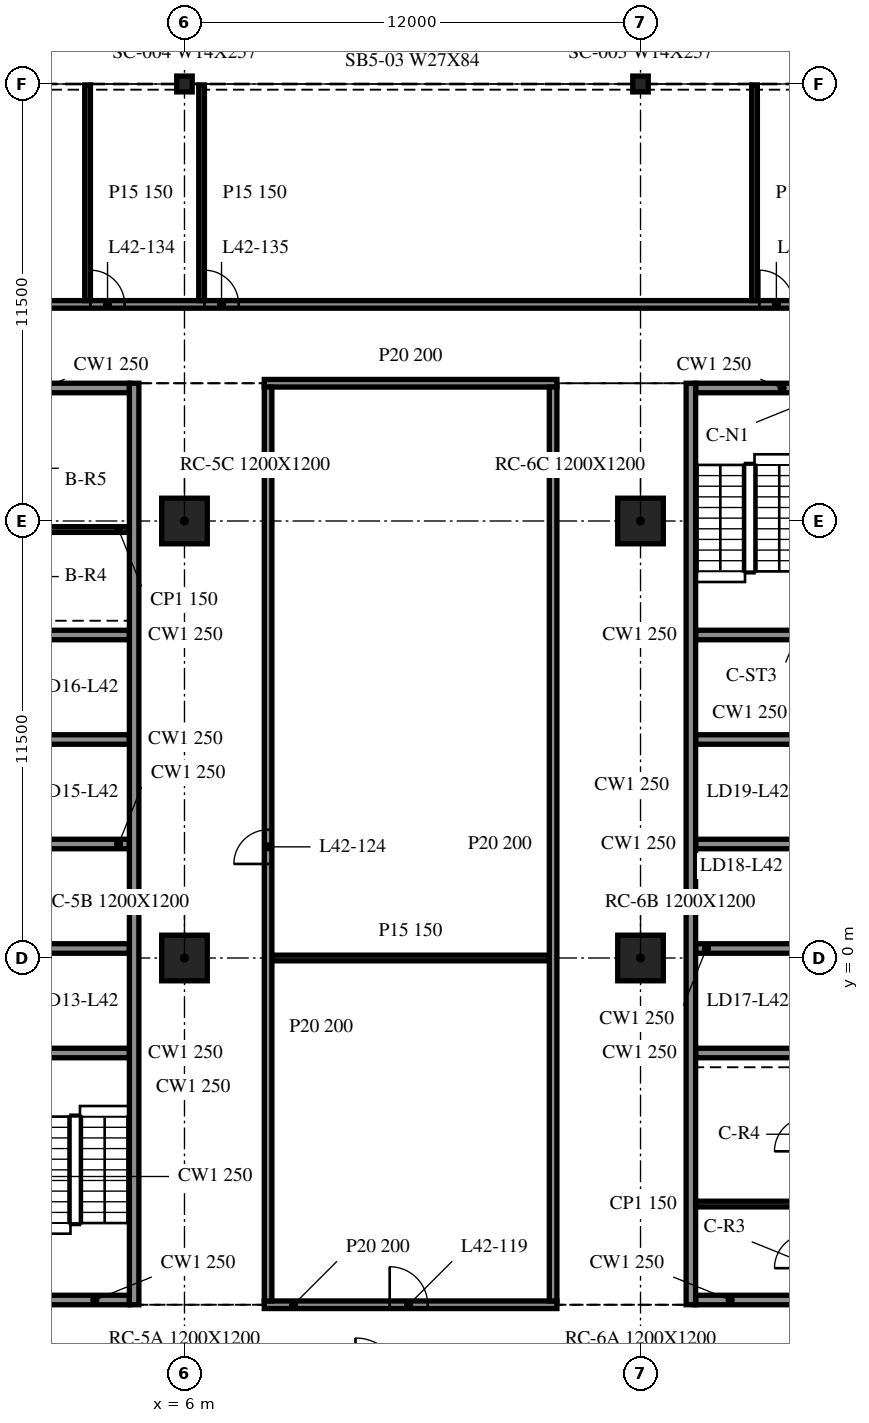
"""IFC4 building model, lengths in metres.
Left out: names, types, materials, properties, quantities, classifications, styles, units other than length and angle.
Written with IfcOpenShell. Run it as: python <this file> out.ifc"""

import sys

from ifc_helpers import new_model, si_unit, direction, frame, frame_2d, origin, origin_2d, place, context, subcontext, project, spatial, rectangle, i_section, extrude, element, fill, save


model = new_model("IFC4")
c1 = context("Model", 3, precision=1e-05, world=origin(), true_north=direction((0.0, 1.0)))
c2 = subcontext(c1, "Body", "Model", "MODEL_VIEW")
j1 = project(units=[si_unit("LENGTHUNIT", "METRE"), si_unit("PLANEANGLEUNIT", "RADIAN")], contexts=[c1])
p1 = place(None, origin())
s1 = spatial("IfcSite", under=j1, at=p1, CompositionType="ELEMENT")
p2 = place(p1, origin())
s2 = spatial("IfcBuilding", under=s1, at=p2, CompositionType="ELEMENT")
p3 = place(p2, frame((0.0, 0.0, 178.2)))
s3 = spatial("IfcBuildingStorey", under=s2, at=p3, CompositionType="ELEMENT", Elevation=178.2)
for number, where, z_axis, x_axis in (
    (1, (6.0, 0.0, -0.34), (0.0, 0.0, 1.0), (1.0, 0.0, 0.0)),
    (2, (6.0, 11.5, -0.34), (0.0, 0.0, 1.0), (1.0, 0.0, 0.0)),
    (3, (18.0, 0.0, -0.34), (0.0, 0.0, 1.0), (1.0, 0.0, 0.0)),
    (4, (18.0, 11.5, -0.34), (0.0, 0.0, 1.0), (1.0, 0.0, 0.0)),
):
    element("IfcColumn", number, at=place(p3, frame(where, z_axis=z_axis, x_axis=x_axis)), inside=s3, PredefinedType="COLUMN", context=c2, shape_type="SweptSolid", body=[
        extrude(rectangle(XDim=1.2, YDim=1.2, at=origin_2d()), origin(), (0.0, 0.0, 1.0), 3.8),
    ])
for number, where, z_axis, x_axis in (
    (5, (18.0, 23.0, -0.34), (0.0, 0.0, 1.0), (1.0, 0.0, 0.0)),
    (6, (6.0, 23.0, -0.34), (0.0, 0.0, 1.0), (1.0, 0.0, 0.0)),
):
    element("IfcColumn", number, at=place(p3, frame(where, z_axis=z_axis, x_axis=x_axis)), inside=s3, PredefinedType="COLUMN", context=c2, shape_type="SweptSolid", body=[
        extrude(i_section(OverallWidth=0.406, OverallDepth=0.417, WebThickness=0.03, FlangeThickness=0.048, at=origin_2d()), origin(), (0.0, 0.0, 1.0), 3.8),
    ])
p4 = place(p3, frame((4.675, -9.125, 0.0), z_axis=(0.0, 0.0, 1.0), x_axis=(0.0, 1.0, 0.0)))
e7 = element("IfcWall", 7, at=p4, inside=s3, PredefinedType="SOLIDWALL", context=c2, shape_type="SweptSolid", body=[
    extrude(rectangle(XDim=24.25, YDim=0.25, at=frame_2d((12.125, 0.0))), origin(), (0.0, 0.0, 1.0), 3.46),
])
p5 = place(p3, frame((4.55, -9.0, 0.0), z_axis=(0.0, 0.0, 1.0), x_axis=(-1.0, 0.0, 0.0)))
e8 = element("IfcWall", 8, at=p5, inside=s3, PredefinedType="SOLIDWALL", context=c2, shape_type="SweptSolid", body=[
    extrude(rectangle(XDim=9.1, YDim=0.25, at=frame_2d((4.55, 0.0))), origin(), (0.0, 0.0, 1.0), 3.46),
])
p6 = place(p5, frame((3.65, 0.0, 0.0)))
e9 = element("IfcOpeningElement", 9, at=p6, cuts=e8, PredefinedType="OPENING", context=c2, shape_type="SweptSolid", body=[
    extrude(rectangle(XDim=1.8, YDim=2.1, at=frame_2d((0.9, 1.05))), frame((0.0, 0.135, 0.0), z_axis=(0.0, -1.0, 0.0), x_axis=(1.0, 0.0, 0.0)), (0.0, 0.0, 1.0), 0.27),
])
p7 = place(p3, frame((-4.55, 15.0, 0.0), z_axis=(0.0, 0.0, 1.0), x_axis=(1.0, 0.0, 0.0)))
e10 = element("IfcWall", 10, at=p7, inside=s3, PredefinedType="SOLIDWALL", context=c2, shape_type="SweptSolid", body=[
    extrude(rectangle(XDim=9.1, YDim=0.25, at=frame_2d((4.55, 0.0))), origin(), (0.0, 0.0, 1.0), 3.46),
])
p8 = place(p7, frame((3.65, 0.0, 0.0)))
e11 = element("IfcOpeningElement", 11, at=p8, cuts=e10, PredefinedType="OPENING", context=c2, shape_type="SweptSolid", body=[
    extrude(rectangle(XDim=1.8, YDim=2.1, at=frame_2d((0.9, 1.05))), frame((0.0, 0.135, 0.0), z_axis=(0.0, -1.0, 0.0), x_axis=(1.0, 0.0, 0.0)), (0.0, 0.0, 1.0), 0.27),
])
for number, where, z_axis, x_axis in (
    (12, (1.7, -2.5, 0.0), (0.0, 0.0, 1.0), (1.0, 0.0, 0.0)),
    (13, (1.7, 0.25, 0.0), (0.0, 0.0, 1.0), (1.0, 0.0, 0.0)),
    (14, (1.7, 3.0, 0.0), (0.0, 0.0, 1.0), (1.0, 0.0, 0.0)),
    (15, (1.7, 5.75, 0.0), (0.0, 0.0, 1.0), (1.0, 0.0, 0.0)),
    (16, (1.7, 8.5, 0.0), (0.0, 0.0, 1.0), (1.0, 0.0, 0.0)),
):
    element("IfcWall", number, at=place(p3, frame(where, z_axis=z_axis, x_axis=x_axis)), inside=s3, PredefinedType="SOLIDWALL", context=c2, shape_type="SweptSolid", body=[
        extrude(rectangle(XDim=2.85, YDim=0.25, at=frame_2d((1.425, 0.0))), origin(), (0.0, 0.0, 1.0), 3.46),
    ])
p9 = place(p3, frame((1.7, 11.275, 0.0), z_axis=(0.0, 0.0, 1.0), x_axis=(1.0, 0.0, 0.0)))
e17 = element("IfcWall", 17, at=p9, inside=s3, PredefinedType="PARTITIONING", context=c2, shape_type="SweptSolid", body=[
    extrude(rectangle(XDim=2.85, YDim=0.15, at=frame_2d((1.425, 0.0))), origin(), (0.0, 0.0, 1.0), 3.46),
])
p10 = place(p3, frame((19.325, 15.125, 0.0), z_axis=(0.0, 0.0, 1.0), x_axis=(0.0, -1.0, 0.0)))
e18 = element("IfcWall", 18, at=p10, inside=s3, PredefinedType="SOLIDWALL", context=c2, shape_type="SweptSolid", body=[
    extrude(rectangle(XDim=24.25, YDim=0.25, at=frame_2d((12.125, 0.0))), origin(), (0.0, 0.0, 1.0), 3.46),
])
p11 = place(p3, frame((28.55, -9.0, 0.0), z_axis=(0.0, 0.0, 1.0), x_axis=(-1.0, 0.0, 0.0)))
e19 = element("IfcWall", 19, at=p11, inside=s3, PredefinedType="SOLIDWALL", context=c2, shape_type="SweptSolid", body=[
    extrude(rectangle(XDim=9.1, YDim=0.25, at=frame_2d((4.55, 0.0))), origin(), (0.0, 0.0, 1.0), 3.46),
])
p12 = place(p11, frame((3.65, 0.0, 0.0)))
e20 = element("IfcOpeningElement", 20, at=p12, cuts=e19, PredefinedType="OPENING", context=c2, shape_type="SweptSolid", body=[
    extrude(rectangle(XDim=1.8, YDim=2.1, at=frame_2d((0.9, 1.05))), frame((0.0, 0.135, 0.0), z_axis=(0.0, -1.0, 0.0), x_axis=(1.0, 0.0, 0.0)), (0.0, 0.0, 1.0), 0.27),
])
p13 = place(p3, frame((19.45, 15.0, 0.0), z_axis=(0.0, 0.0, 1.0), x_axis=(1.0, 0.0, 0.0)))
e21 = element("IfcWall", 21, at=p13, inside=s3, PredefinedType="SOLIDWALL", context=c2, shape_type="SweptSolid", body=[
    extrude(rectangle(XDim=9.1, YDim=0.25, at=frame_2d((4.55, 0.0))), origin(), (0.0, 0.0, 1.0), 3.46),
])
p14 = place(p13, frame((3.65, 0.0, 0.0)))
e22 = element("IfcOpeningElement", 22, at=p14, cuts=e21, PredefinedType="OPENING", context=c2, shape_type="SweptSolid", body=[
    extrude(rectangle(XDim=1.8, YDim=2.1, at=frame_2d((0.9, 1.05))), frame((0.0, 0.135, 0.0), z_axis=(0.0, -1.0, 0.0), x_axis=(1.0, 0.0, 0.0)), (0.0, 0.0, 1.0), 0.27),
])
for number, where, z_axis, x_axis in (
    (23, (19.45, -2.5, 0.0), (0.0, 0.0, 1.0), (1.0, 0.0, 0.0)),
    (24, (19.45, 0.25, 0.0), (0.0, 0.0, 1.0), (1.0, 0.0, 0.0)),
    (25, (19.45, 3.0, 0.0), (0.0, 0.0, 1.0), (1.0, 0.0, 0.0)),
    (26, (19.45, 5.75, 0.0), (0.0, 0.0, 1.0), (1.0, 0.0, 0.0)),
    (27, (19.45, 8.5, 0.0), (0.0, 0.0, 1.0), (1.0, 0.0, 0.0)),
):
    element("IfcWall", number, at=place(p3, frame(where, z_axis=z_axis, x_axis=x_axis)), inside=s3, PredefinedType="SOLIDWALL", context=c2, shape_type="SweptSolid", body=[
        extrude(rectangle(XDim=2.85, YDim=0.25, at=frame_2d((1.425, 0.0))), origin(), (0.0, 0.0, 1.0), 3.46),
    ])
p15 = place(p3, frame((19.45, -6.475, 0.0), z_axis=(0.0, 0.0, 1.0), x_axis=(1.0, 0.0, 0.0)))
e28 = element("IfcWall", 28, at=p15, inside=s3, PredefinedType="PARTITIONING", context=c2, shape_type="SweptSolid", body=[
    extrude(rectangle(XDim=2.85, YDim=0.15, at=frame_2d((1.425, 0.0))), origin(), (0.0, 0.0, 1.0), 3.46),
])
p16 = place(p3, frame((8.1, -9.125, 0.0), z_axis=(0.0, 0.0, 1.0), x_axis=(1.0, 0.0, 0.0)))
e29 = element("IfcWall", 29, at=p16, inside=s3, PredefinedType="PARTITIONING", context=c2, shape_type="SweptSolid", body=[
    extrude(rectangle(XDim=7.7, YDim=0.2, at=frame_2d((3.85, 0.0))), origin(), (0.0, 0.0, 1.0), 3.46),
])
p17 = place(p16, frame((3.3, 0.0, 0.0)))
e30 = element("IfcOpeningElement", 30, at=p17, cuts=e29, PredefinedType="OPENING", context=c2, shape_type="SweptSolid", body=[
    extrude(rectangle(XDim=1.0, YDim=2.1, at=frame_2d((0.5, 1.05))), frame((0.0, 0.11, 0.0), z_axis=(0.0, -1.0, 0.0), x_axis=(1.0, 0.0, 0.0)), (0.0, 0.0, 1.0), 0.22),
])
p18 = place(p3, frame((8.3, 0.0, 0.0), z_axis=(0.0, 0.0, 1.0), x_axis=(1.0, 0.0, 0.0)))
e31 = element("IfcWall", 31, at=p18, inside=s3, PredefinedType="PARTITIONING", context=c2, shape_type="SweptSolid", body=[
    extrude(rectangle(XDim=7.3, YDim=0.15, at=frame_2d((3.65, 0.0))), origin(), (0.0, 0.0, 1.0), 3.46),
])
p19 = place(p3, frame((8.1, 15.125, 0.0), z_axis=(0.0, 0.0, 1.0), x_axis=(1.0, 0.0, 0.0)))
e32 = element("IfcWall", 32, at=p19, inside=s3, PredefinedType="PARTITIONING", context=c2, shape_type="SweptSolid", body=[
    extrude(rectangle(XDim=7.7, YDim=0.2, at=frame_2d((3.85, 0.0))), origin(), (0.0, 0.0, 1.0), 3.46),
])
p20 = place(p3, frame((-47.975, 17.2, 0.0), z_axis=(0.0, 0.0, 1.0), x_axis=(1.0, 0.0, 0.0)))
e33 = element("IfcWall", 33, at=p20, inside=s3, PredefinedType="PARTITIONING", context=c2, shape_type="SweptSolid", body=[
    extrude(rectangle(XDim=95.95, YDim=0.2, at=frame_2d((47.975, 0.0))), origin(), (0.0, 0.0, 1.0), 3.46),
])
p21 = place(p20, frame((13.7, 0.0, 0.0)))
e34 = element("IfcOpeningElement", 34, at=p21, cuts=e33, PredefinedType="OPENING", context=c2, shape_type="SweptSolid", body=[
    extrude(rectangle(XDim=0.9, YDim=2.1, at=frame_2d((0.45, 1.05))), frame((0.0, 0.11, 0.0), z_axis=(0.0, -1.0, 0.0), x_axis=(1.0, 0.0, 0.0)), (0.0, 0.0, 1.0), 0.22),
])
p22 = place(p20, frame((19.7, 0.0, 0.0)))
e35 = element("IfcOpeningElement", 35, at=p22, cuts=e33, PredefinedType="OPENING", context=c2, shape_type="SweptSolid", body=[
    extrude(rectangle(XDim=0.9, YDim=2.1, at=frame_2d((0.45, 1.05))), frame((0.0, 0.11, 0.0), z_axis=(0.0, -1.0, 0.0), x_axis=(1.0, 0.0, 0.0)), (0.0, 0.0, 1.0), 0.22),
])
p23 = place(p20, frame((23.1, 0.0, 0.0)))
e36 = element("IfcOpeningElement", 36, at=p23, cuts=e33, PredefinedType="OPENING", context=c2, shape_type="SweptSolid", body=[
    extrude(rectangle(XDim=0.9, YDim=2.1, at=frame_2d((0.45, 1.05))), frame((0.0, 0.11, 0.0), z_axis=(0.0, -1.0, 0.0), x_axis=(1.0, 0.0, 0.0)), (0.0, 0.0, 1.0), 0.22),
])
p24 = place(p20, frame((25.7, 0.0, 0.0)))
e37 = element("IfcOpeningElement", 37, at=p24, cuts=e33, PredefinedType="OPENING", context=c2, shape_type="SweptSolid", body=[
    extrude(rectangle(XDim=0.9, YDim=2.1, at=frame_2d((0.45, 1.05))), frame((0.0, 0.11, 0.0), z_axis=(0.0, -1.0, 0.0), x_axis=(1.0, 0.0, 0.0)), (0.0, 0.0, 1.0), 0.22),
])
p25 = place(p20, frame((40.7, 0.0, 0.0)))
e38 = element("IfcOpeningElement", 38, at=p25, cuts=e33, PredefinedType="OPENING", context=c2, shape_type="SweptSolid", body=[
    extrude(rectangle(XDim=0.9, YDim=2.1, at=frame_2d((0.45, 1.05))), frame((0.0, 0.11, 0.0), z_axis=(0.0, -1.0, 0.0), x_axis=(1.0, 0.0, 0.0)), (0.0, 0.0, 1.0), 0.22),
])
p26 = place(p20, frame((46.7, 0.0, 0.0)))
e39 = element("IfcOpeningElement", 39, at=p26, cuts=e33, PredefinedType="OPENING", context=c2, shape_type="SweptSolid", body=[
    extrude(rectangle(XDim=0.9, YDim=2.1, at=frame_2d((0.45, 1.05))), frame((0.0, 0.11, 0.0), z_axis=(0.0, -1.0, 0.0), x_axis=(1.0, 0.0, 0.0)), (0.0, 0.0, 1.0), 0.22),
])
p27 = place(p20, frame((48.1, 0.0, 0.0)))
e40 = element("IfcOpeningElement", 40, at=p27, cuts=e33, PredefinedType="OPENING", context=c2, shape_type="SweptSolid", body=[
    extrude(rectangle(XDim=0.9, YDim=2.1, at=frame_2d((0.45, 1.05))), frame((0.0, 0.11, 0.0), z_axis=(0.0, -1.0, 0.0), x_axis=(1.0, 0.0, 0.0)), (0.0, 0.0, 1.0), 0.22),
])
p28 = place(p20, frame((51.5, 0.0, 0.0)))
e41 = element("IfcOpeningElement", 41, at=p28, cuts=e33, PredefinedType="OPENING", context=c2, shape_type="SweptSolid", body=[
    extrude(rectangle(XDim=0.9, YDim=2.1, at=frame_2d((0.45, 1.05))), frame((0.0, 0.11, 0.0), z_axis=(0.0, -1.0, 0.0), x_axis=(1.0, 0.0, 0.0)), (0.0, 0.0, 1.0), 0.22),
])
p29 = place(p20, frame((54.5, 0.0, 0.0)))
e42 = element("IfcOpeningElement", 42, at=p29, cuts=e33, PredefinedType="OPENING", context=c2, shape_type="SweptSolid", body=[
    extrude(rectangle(XDim=0.9, YDim=2.1, at=frame_2d((0.45, 1.05))), frame((0.0, 0.11, 0.0), z_axis=(0.0, -1.0, 0.0), x_axis=(1.0, 0.0, 0.0)), (0.0, 0.0, 1.0), 0.22),
])
p30 = place(p20, frame((69.1, 0.0, 0.0)))
e43 = element("IfcOpeningElement", 43, at=p30, cuts=e33, PredefinedType="OPENING", context=c2, shape_type="SweptSolid", body=[
    extrude(rectangle(XDim=0.9, YDim=2.1, at=frame_2d((0.45, 1.05))), frame((0.0, 0.11, 0.0), z_axis=(0.0, -1.0, 0.0), x_axis=(1.0, 0.0, 0.0)), (0.0, 0.0, 1.0), 0.22),
])
p31 = place(p20, frame((75.1, 0.0, 0.0)))
e44 = element("IfcOpeningElement", 44, at=p31, cuts=e33, PredefinedType="OPENING", context=c2, shape_type="SweptSolid", body=[
    extrude(rectangle(XDim=0.9, YDim=2.1, at=frame_2d((0.45, 1.05))), frame((0.0, 0.11, 0.0), z_axis=(0.0, -1.0, 0.0), x_axis=(1.0, 0.0, 0.0)), (0.0, 0.0, 1.0), 0.22),
])
p32 = place(p20, frame((78.1, 0.0, 0.0)))
e45 = element("IfcOpeningElement", 45, at=p32, cuts=e33, PredefinedType="OPENING", context=c2, shape_type="SweptSolid", body=[
    extrude(rectangle(XDim=0.9, YDim=2.1, at=frame_2d((0.45, 1.05))), frame((0.0, 0.11, 0.0), z_axis=(0.0, -1.0, 0.0), x_axis=(1.0, 0.0, 0.0)), (0.0, 0.0, 1.0), 0.22),
])
p33 = place(p20, frame((81.1, 0.0, 0.0)))
e46 = element("IfcOpeningElement", 46, at=p33, cuts=e33, PredefinedType="OPENING", context=c2, shape_type="SweptSolid", body=[
    extrude(rectangle(XDim=0.9, YDim=2.1, at=frame_2d((0.45, 1.05))), frame((0.0, 0.11, 0.0), z_axis=(0.0, -1.0, 0.0), x_axis=(1.0, 0.0, 0.0)), (0.0, 0.0, 1.0), 0.22),
])
for number, where, z_axis, x_axis in (
    (47, (3.45, 17.3, 0.0), (0.0, 0.0, 1.0), (0.0, 1.0, 0.0)),
    (48, (6.45, 17.3, 0.0), (0.0, 0.0, 1.0), (0.0, 1.0, 0.0)),
):
    element("IfcWall", number, at=place(p3, frame(where, z_axis=z_axis, x_axis=x_axis)), inside=s3, PredefinedType="PARTITIONING", context=c2, shape_type="SweptSolid", body=[
        extrude(rectangle(XDim=5.675, YDim=0.15, at=frame_2d((2.837, 0.0))), origin(), (0.0, 0.0, 1.0), 3.46),
    ])
p34 = place(p3, frame((8.2, -9.025, 0.0), z_axis=(0.0, 0.0, 1.0), x_axis=(0.0, 1.0, 0.0)))
e49 = element("IfcWall", 49, at=p34, inside=s3, PredefinedType="PARTITIONING", context=c2, shape_type="SweptSolid", body=[
    extrude(rectangle(XDim=24.05, YDim=0.2, at=frame_2d((12.025, 0.0))), origin(), (0.0, 0.0, 1.0), 3.46),
])
p35 = place(p34, frame((11.5, 0.0, 0.0)))
e50 = element("IfcOpeningElement", 50, at=p35, cuts=e49, PredefinedType="OPENING", context=c2, shape_type="SweptSolid", body=[
    extrude(rectangle(XDim=0.9, YDim=2.1, at=frame_2d((0.45, 1.05))), frame((0.0, 0.11, 0.0), z_axis=(0.0, -1.0, 0.0), x_axis=(1.0, 0.0, 0.0)), (0.0, 0.0, 1.0), 0.22),
])
p36 = place(p3, frame((15.7, -9.025, 0.0), z_axis=(0.0, 0.0, 1.0), x_axis=(0.0, 1.0, 0.0)))
e51 = element("IfcWall", 51, at=p36, inside=s3, PredefinedType="PARTITIONING", context=c2, shape_type="SweptSolid", body=[
    extrude(rectangle(XDim=24.05, YDim=0.2, at=frame_2d((12.025, 0.0))), origin(), (0.0, 0.0, 1.0), 3.46),
])
p37 = place(p3, frame((21.0, 17.3, 0.0), z_axis=(0.0, 0.0, 1.0), x_axis=(0.0, 1.0, 0.0)))
e52 = element("IfcWall", 52, at=p37, inside=s3, PredefinedType="PARTITIONING", context=c2, shape_type="SweptSolid", body=[
    extrude(rectangle(XDim=5.675, YDim=0.15, at=frame_2d((2.837, 0.0))), origin(), (0.0, 0.0, 1.0), 3.46),
])
p38 = place(p17, origin())
e53 = element("IfcDoor", 53, at=p38, inside=s3, OperationType="SINGLE_SWING_LEFT", PredefinedType="DOOR", context=c2, shape_type="SweptSolid", body=[
    extrude(rectangle(XDim=1.0, YDim=2.1, at=frame_2d((0.5, 1.05))), frame((0.0, 0.025, 0.0), z_axis=(0.0, -1.0, 0.0), x_axis=(1.0, 0.0, 0.0)), (0.0, 0.0, 1.0), 0.05),
])
fill(e30, e53)
p39 = place(p35, origin())
e54 = element("IfcDoor", 54, at=p39, inside=s3, OperationType="SINGLE_SWING_RIGHT", PredefinedType="DOOR", context=c2, shape_type="SweptSolid", body=[
    extrude(rectangle(XDim=0.9, YDim=2.1, at=frame_2d((0.45, 1.05))), frame((0.0, 0.025, 0.0), z_axis=(0.0, -1.0, 0.0), x_axis=(1.0, 0.0, 0.0)), (0.0, 0.0, 1.0), 0.05),
])
fill(e50, e54)
p40 = place(p28, origin())
e55 = element("IfcDoor", 55, at=p40, inside=s3, OperationType="SINGLE_SWING_RIGHT", PredefinedType="DOOR", context=c2, shape_type="SweptSolid", body=[
    extrude(rectangle(XDim=0.9, YDim=2.1, at=frame_2d((0.45, 1.05))), frame((0.0, 0.025, 0.0), z_axis=(0.0, -1.0, 0.0), x_axis=(1.0, 0.0, 0.0)), (0.0, 0.0, 1.0), 0.05),
])
fill(e41, e55)
p41 = place(p29, origin())
e56 = element("IfcDoor", 56, at=p41, inside=s3, OperationType="SINGLE_SWING_RIGHT", PredefinedType="DOOR", context=c2, shape_type="SweptSolid", body=[
    extrude(rectangle(XDim=0.9, YDim=2.1, at=frame_2d((0.45, 1.05))), frame((0.0, 0.025, 0.0), z_axis=(0.0, -1.0, 0.0), x_axis=(1.0, 0.0, 0.0)), (0.0, 0.0, 1.0), 0.05),
])
fill(e42, e56)
p42 = place(p30, origin())
e57 = element("IfcDoor", 57, at=p42, inside=s3, OperationType="SINGLE_SWING_RIGHT", PredefinedType="DOOR", context=c2, shape_type="SweptSolid", body=[
    extrude(rectangle(XDim=0.9, YDim=2.1, at=frame_2d((0.45, 1.05))), frame((0.0, 0.025, 0.0), z_axis=(0.0, -1.0, 0.0), x_axis=(1.0, 0.0, 0.0)), (0.0, 0.0, 1.0), 0.05),
])
fill(e43, e57)
save(model, sys.argv[1])
